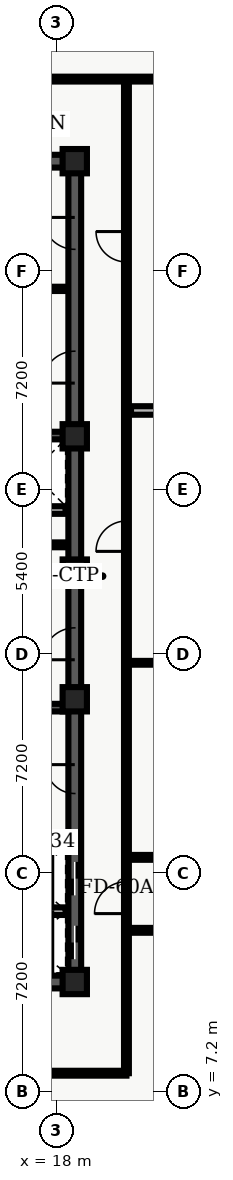
"""IFC4 building model, lengths in metres.
Left out: names, types, materials, properties, quantities, classifications, styles, units other than length and angle.
Written with IfcOpenShell. Run it as: python <this file> out.ifc"""

import sys

from ifc_helpers import new_model, entity, si_unit, converted_unit, direction, frame, origin_with_axes, origin_2d_with_axis, place, context, subcontext, project, spatial, polyline, rectangle, outline, extrude, element, fill, save


model = new_model("IFC4")
c1 = context("Model", 3, precision=1e-05, world=origin_with_axes(), true_north=direction((0.0, 1.0)))
c2 = subcontext(c1, "Body", "Model", "MODEL_VIEW")
j1 = project(units=[si_unit("LENGTHUNIT", "METRE"), converted_unit("PLANEANGLEUNIT", "DEGREE", entity("IfcPlaneAngleMeasure", 0.017), si_unit("PLANEANGLEUNIT", "RADIAN"), dimensions=[0, 0, 0, 0, 0, 0, 0])], contexts=[c1])
p1 = place(None, origin_with_axes())
s1 = spatial("IfcSite", under=j1, at=p1, CompositionType="ELEMENT")
p2 = place(p1, origin_with_axes())
s2 = spatial("IfcBuilding", under=s1, at=p2, CompositionType="ELEMENT")
p3 = place(p2, frame((0.0, 0.0, 256.8), z_axis=(0.0, 0.0, 1.0), x_axis=(1.0, 0.0, 0.0)))
s3 = spatial("IfcBuildingStorey", under=s2, at=p3, CompositionType="ELEMENT", Elevation=256.8)
p4 = place(p3, frame((11.4, 10.8, 0.0), z_axis=(0.0, 0.0, 1.0), x_axis=(1.0, 0.0, 0.0)))
e1 = element("IfcWall", 1, at=p4, inside=s3, PredefinedType="SHEAR", context=c2, shape_type="SweptSolid", body=[
    extrude(outline(polyline([(0.0, -0.21), (7.2, -0.21), (7.2, 0.21), (0.0, 0.21), (0.0, -0.21)])), origin_with_axes(), (0.0, 0.0, 1.0), 3.66),
])
p5 = place(p4, frame((2.625, 0.0, 0.0), z_axis=(0.0, 0.0, 1.0), x_axis=(1.0, 0.0, 0.0)))
e2 = element("IfcOpeningElement", 2, at=p5, cuts=e1, PredefinedType="OPENING", context=c2, shape_type="SweptSolid", body=[
    extrude(rectangle(XDim=1.05, YDim=0.44, at=origin_2d_with_axis()), origin_with_axes(), (0.0, 0.0, 1.0), 2.15),
])
p6 = place(p3, frame((11.4, 37.8, 0.0), z_axis=(0.0, 0.0, 1.0), x_axis=(1.0, 0.0, 0.0)))
e3 = element("IfcWall", 3, at=p6, inside=s3, PredefinedType="SHEAR", context=c2, shape_type="SweptSolid", body=[
    extrude(outline(polyline([(0.0, -0.21), (7.2, -0.21), (7.2, 0.21), (0.0, 0.21), (0.0, -0.21)])), origin_with_axes(), (0.0, 0.0, 1.0), 3.66),
])
p7 = place(p6, frame((2.625, 0.0, 0.0), z_axis=(0.0, 0.0, 1.0), x_axis=(1.0, 0.0, 0.0)))
e4 = element("IfcOpeningElement", 4, at=p7, cuts=e3, PredefinedType="OPENING", context=c2, shape_type="SweptSolid", body=[
    extrude(rectangle(XDim=1.05, YDim=0.44, at=origin_2d_with_axis()), origin_with_axes(), (0.0, 0.0, 1.0), 2.15),
])
p8 = place(p3, frame((18.6, 10.8, 0.0), z_axis=(0.0, 0.0, 1.0), x_axis=(0.0, 1.0, 0.0)))
e5 = element("IfcWall", 5, at=p8, inside=s3, PredefinedType="SHEAR", context=c2, shape_type="SweptSolid", body=[
    extrude(outline(polyline([(0.0, -0.21), (13.5, -0.21), (13.5, 0.21), (0.0, 0.21), (0.0, -0.21)])), origin_with_axes(), (0.0, 0.0, 1.0), 3.66),
])
p9 = place(p8, frame((1.3, 0.0, 0.0), z_axis=(0.0, 0.0, 1.0), x_axis=(1.0, 0.0, 0.0)))
e6 = element("IfcOpeningElement", 6, at=p9, cuts=e5, PredefinedType="OPENING", context=c2, shape_type="SweptSolid", body=[
    extrude(rectangle(XDim=1.1, YDim=0.44, at=origin_2d_with_axis()), origin_with_axes(), (0.0, 0.0, 1.0), 2.15),
])
p10 = place(p8, frame((3.4, 0.0, 0.0), z_axis=(0.0, 0.0, 1.0), x_axis=(1.0, 0.0, 0.0)))
e7 = element("IfcOpeningElement", 7, at=p10, cuts=e5, PredefinedType="OPENING", context=c2, shape_type="SweptSolid", body=[
    extrude(rectangle(XDim=1.1, YDim=0.44, at=origin_2d_with_axis()), origin_with_axes(), (0.0, 0.0, 1.0), 2.15),
])
p11 = place(p8, frame((11.125, 0.0, 0.0), z_axis=(0.0, 0.0, 1.0), x_axis=(1.0, 0.0, 0.0)))
e8 = element("IfcOpeningElement", 8, at=p11, cuts=e5, PredefinedType="OPENING", context=c2, shape_type="SweptSolid", body=[
    extrude(rectangle(XDim=1.05, YDim=0.44, at=origin_2d_with_axis()), origin_with_axes(), (0.0, 0.0, 1.0), 2.15),
])
p12 = place(p8, frame((6.675, 0.0, 0.0), z_axis=(0.0, 0.0, 1.0), x_axis=(1.0, 0.0, 0.0)))
e9 = element("IfcOpeningElement", 9, at=p12, cuts=e5, PredefinedType="OPENING", context=c2, shape_type="SweptSolid", body=[
    extrude(rectangle(XDim=0.95, YDim=0.44, at=origin_2d_with_axis()), origin_with_axes(), (0.0, 0.0, 1.0), 2.15),
])
p13 = place(p3, frame((18.6, 24.3, 0.0), z_axis=(0.0, 0.0, 1.0), x_axis=(0.0, 1.0, 0.0)))
e10 = element("IfcWall", 10, at=p13, inside=s3, PredefinedType="SHEAR", context=c2, shape_type="SweptSolid", body=[
    extrude(outline(polyline([(0.0, -0.21), (13.5, -0.21), (13.5, 0.21), (0.0, 0.21), (0.0, -0.21)])), origin_with_axes(), (0.0, 0.0, 1.0), 3.66),
])
p14 = place(p13, frame((6.725, 0.0, 0.0), z_axis=(0.0, 0.0, 1.0), x_axis=(1.0, 0.0, 0.0)))
e11 = element("IfcOpeningElement", 11, at=p14, cuts=e10, PredefinedType="OPENING", context=c2, shape_type="SweptSolid", body=[
    extrude(rectangle(XDim=1.05, YDim=0.44, at=origin_2d_with_axis()), origin_with_axes(), (0.0, 0.0, 1.0), 2.15),
])
p15 = place(p13, frame((11.125, 0.0, 0.0), z_axis=(0.0, 0.0, 1.0), x_axis=(1.0, 0.0, 0.0)))
e12 = element("IfcOpeningElement", 12, at=p15, cuts=e10, PredefinedType="OPENING", context=c2, shape_type="SweptSolid", body=[
    extrude(rectangle(XDim=1.05, YDim=0.44, at=origin_2d_with_axis()), origin_with_axes(), (0.0, 0.0, 1.0), 2.15),
])
for number, where, z_axis, x_axis in (
    (13, (11.61, 19.825, 0.0), (0.0, 0.0, 1.0), (1.0, 0.0, 0.0)),
    (14, (11.61, 28.775, 0.0), (0.0, 0.0, 1.0), (1.0, 0.0, 0.0)),
):
    element("IfcWall", number, at=place(p3, frame(where, z_axis=z_axis, x_axis=x_axis)), inside=s3, PredefinedType="SHEAR", context=c2, shape_type="SweptSolid", body=[
        extrude(outline(polyline([(0.0, -0.125), (6.78, -0.125), (6.78, 0.125), (0.0, 0.125), (0.0, -0.125)])), origin_with_axes(), (0.0, 0.0, 1.0), 3.66),
    ])
p16 = place(p3, frame((11.7, 24.1, 0.0), z_axis=(0.0, 0.0, 1.0), x_axis=(1.0, 0.0, 0.0)))
e15 = element("IfcWall", 15, at=p16, inside=s3, PredefinedType="SOLIDWALL", context=c2, shape_type="SweptSolid", body=[
    extrude(outline(polyline([(0.0, -0.125), (6.6, -0.125), (6.6, 0.125), (0.0, 0.125), (0.0, -0.125)])), origin_with_axes(), (0.0, 0.0, 1.0), 2.7),
])
p17 = place(p16, frame((3.75, 0.0, 0.0), z_axis=(0.0, 0.0, 1.0), x_axis=(1.0, 0.0, 0.0)))
e16 = element("IfcOpeningElement", 16, at=p17, cuts=e15, PredefinedType="OPENING", context=c2, shape_type="SweptSolid", body=[
    extrude(rectangle(XDim=0.9, YDim=0.27, at=origin_2d_with_axis()), origin_with_axes(), (0.0, 0.0, 1.0), 2.15),
])
p18 = place(p3, frame((11.7, 26.325, 0.0), z_axis=(0.0, 0.0, 1.0), x_axis=(1.0, 0.0, 0.0)))
e17 = element("IfcWall", 17, at=p18, inside=s3, PredefinedType="SOLIDWALL", context=c2, shape_type="SweptSolid", body=[
    extrude(outline(polyline([(0.0, -0.125), (6.6, -0.125), (6.6, 0.125), (0.0, 0.125), (0.0, -0.125)])), origin_with_axes(), (0.0, 0.0, 1.0), 2.7),
])
p19 = place(p18, frame((3.5, 0.0, 0.0), z_axis=(0.0, 0.0, 1.0), x_axis=(1.0, 0.0, 0.0)))
e18 = element("IfcOpeningElement", 18, at=p19, cuts=e17, PredefinedType="OPENING", context=c2, shape_type="SweptSolid", body=[
    extrude(rectangle(XDim=0.9, YDim=0.27, at=origin_2d_with_axis()), origin_with_axes(), (0.0, 0.0, 1.0), 2.15),
])
for number, where, z_axis, x_axis in (
    (19, (18.6, 10.8, 0.0), (0.0, 0.0, 1.0), (1.0, 0.0, 0.0)),
    (20, (18.6, 20.1, 0.0), (0.0, 0.0, 1.0), (1.0, 0.0, 0.0)),
    (21, (18.6, 24.3, 0.0), (0.0, 0.0, 1.0), (1.0, 0.0, 0.0)),
    (22, (18.6, 28.75, 0.0), (0.0, 0.0, 1.0), (1.0, 0.0, 0.0)),
    (23, (18.6, 37.8, 0.0), (0.0, 0.0, 1.0), (1.0, 0.0, 0.0)),
):
    element("IfcColumn", number, at=place(p3, frame(where, z_axis=z_axis, x_axis=x_axis)), inside=s3, PredefinedType="COLUMN", context=c2, shape_type="SweptSolid", body=[
        extrude(rectangle(XDim=0.8, YDim=0.8, at=origin_2d_with_axis()), origin_with_axes(), (0.0, 0.0, 1.0), 3.9),
    ])
p20 = place(p3, frame((14.62, 25.18, 0.0), z_axis=(0.0, 0.0, 1.0), x_axis=(1.0, 0.0, 0.0)))
e24 = element("IfcWall", 24, at=p20, inside=s3, PredefinedType="PARTITIONING", context=c2, shape_type="SweptSolid", body=[
    extrude(outline(polyline([(0.0, -0.08), (3.68, -0.08), (3.68, 0.08), (0.0, 0.08), (0.0, -0.08)])), origin_with_axes(), (0.0, 0.0, 1.0), 2.7),
])
p21 = place(p20, frame((1.95, 0.0, 0.0), z_axis=(0.0, 0.0, 1.0), x_axis=(1.0, 0.0, 0.0)))
e25 = element("IfcOpeningElement", 25, at=p21, cuts=e24, PredefinedType="OPENING", context=c2, shape_type="SweptSolid", body=[
    extrude(rectangle(XDim=0.9, YDim=0.18, at=origin_2d_with_axis()), origin_with_axes(), (0.0, 0.0, 1.0), 2.15),
])
for number, where, z_axis, x_axis in (
    (26, (15.84, 13.13, 0.0), (0.0, 0.0, 1.0), (1.0, 0.0, 0.0)),
    (27, (15.84, 15.27, 0.0), (0.0, 0.0, 1.0), (1.0, 0.0, 0.0)),
):
    element("IfcWall", number, at=place(p3, frame(where, z_axis=z_axis, x_axis=x_axis)), inside=s3, PredefinedType="SOLIDWALL", context=c2, shape_type="SweptSolid", body=[
        extrude(outline(polyline([(0.0, -0.125), (2.46, -0.125), (2.46, 0.125), (0.0, 0.125), (0.0, -0.125)])), origin_with_axes(), (0.0, 0.0, 1.0), 2.7),
    ])
p22 = place(p3, frame((15.84, 33.6, 0.0), z_axis=(0.0, 0.0, 1.0), x_axis=(1.0, 0.0, 0.0)))
e28 = element("IfcWall", 28, at=p22, inside=s3, PredefinedType="PARTITIONING", context=c2, shape_type="SweptSolid", body=[
    extrude(outline(polyline([(0.0, -0.07), (2.46, -0.07), (2.46, 0.07), (0.0, 0.07), (0.0, -0.07)])), origin_with_axes(), (0.0, 0.0, 1.0), 2.7),
])
p23 = place(p3, frame((8.135, 7.8, 0.0), z_axis=(0.0, 0.0, 1.0), x_axis=(1.0, 0.0, 0.0)))
e29 = element("IfcWall", 29, at=p23, inside=s3, PredefinedType="PARTITIONING", context=c2, shape_type="SweptSolid", body=[
    extrude(outline(polyline([(0.0, -0.08), (12.165, -0.08), (12.165, 0.08), (0.0, 0.08), (0.0, -0.08)])), origin_with_axes(), (0.0, 0.0, 1.0), 2.7),
])
p24 = place(p23, frame((3.967, 0.0, 0.0), z_axis=(0.0, 0.0, 1.0), x_axis=(1.0, 0.0, 0.0)))
e30 = element("IfcOpeningElement", 30, at=p24, cuts=e29, PredefinedType="OPENING", context=c2, shape_type="SweptSolid", body=[
    extrude(rectangle(XDim=1.0, YDim=0.18, at=origin_2d_with_axis()), origin_with_axes(), (0.0, 0.0, 1.0), 2.15),
])
p25 = place(p23, frame((8.767, 0.0, 0.0), z_axis=(0.0, 0.0, 1.0), x_axis=(1.0, 0.0, 0.0)))
e31 = element("IfcOpeningElement", 31, at=p25, cuts=e29, PredefinedType="OPENING", context=c2, shape_type="SweptSolid", body=[
    extrude(rectangle(XDim=1.0, YDim=0.18, at=origin_2d_with_axis()), origin_with_axes(), (0.0, 0.0, 1.0), 2.15),
])
p26 = place(p3, frame((8.135, 40.5, 0.0), z_axis=(0.0, 0.0, 1.0), x_axis=(1.0, 0.0, 0.0)))
e32 = element("IfcWall", 32, at=p26, inside=s3, PredefinedType="PARTITIONING", context=c2, shape_type="SweptSolid", body=[
    extrude(outline(polyline([(0.0, -0.08), (23.93, -0.08), (23.93, 0.08), (0.0, 0.08), (0.0, -0.08)])), origin_with_axes(), (0.0, 0.0, 1.0), 2.7),
])
p27 = place(p26, frame((0.76, 0.0, 0.0), z_axis=(0.0, 0.0, 1.0), x_axis=(1.0, 0.0, 0.0)))
e33 = element("IfcOpeningElement", 33, at=p27, cuts=e32, PredefinedType="OPENING", context=c2, shape_type="SweptSolid", body=[
    extrude(rectangle(XDim=1.0, YDim=0.18, at=origin_2d_with_axis()), origin_with_axes(), (0.0, 0.0, 1.0), 2.15),
])
p28 = place(p26, frame((7.625, 0.0, 0.0), z_axis=(0.0, 0.0, 1.0), x_axis=(1.0, 0.0, 0.0)))
e34 = element("IfcOpeningElement", 34, at=p28, cuts=e32, PredefinedType="OPENING", context=c2, shape_type="SweptSolid", body=[
    extrude(rectangle(XDim=1.0, YDim=0.18, at=origin_2d_with_axis()), origin_with_axes(), (0.0, 0.0, 1.0), 2.15),
])
p29 = place(p3, frame((20.3, 7.8, 0.0), z_axis=(0.0, 0.0, 1.0), x_axis=(0.0, 1.0, 0.0)))
e35 = element("IfcWall", 35, at=p29, inside=s3, PredefinedType="PARTITIONING", context=c2, shape_type="SweptSolid", body=[
    extrude(outline(polyline([(0.0, -0.08), (32.7, -0.08), (32.7, 0.08), (0.0, 0.08), (0.0, -0.08)])), origin_with_axes(), (0.0, 0.0, 1.0), 2.7),
])
p30 = place(p29, frame((17.665, 0.0, 0.0), z_axis=(0.0, 0.0, 1.0), x_axis=(1.0, 0.0, 0.0)))
e36 = element("IfcOpeningElement", 36, at=p30, cuts=e35, PredefinedType="OPENING", context=c2, shape_type="SweptSolid", body=[
    extrude(rectangle(XDim=1.0, YDim=0.18, at=origin_2d_with_axis()), origin_with_axes(), (0.0, 0.0, 1.0), 2.15),
])
p31 = place(p29, frame((27.185, 0.0, 0.0), z_axis=(0.0, 0.0, 1.0), x_axis=(1.0, 0.0, 0.0)))
e37 = element("IfcOpeningElement", 37, at=p31, cuts=e35, PredefinedType="OPENING", context=c2, shape_type="SweptSolid", body=[
    extrude(rectangle(XDim=1.0, YDim=0.18, at=origin_2d_with_axis()), origin_with_axes(), (0.0, 0.0, 1.0), 2.15),
])
p32 = place(p29, frame((5.775, 0.0, 0.0), z_axis=(0.0, 0.0, 1.0), x_axis=(1.0, 0.0, 0.0)))
e38 = element("IfcOpeningElement", 38, at=p32, cuts=e35, PredefinedType="OPENING", context=c2, shape_type="SweptSolid", body=[
    extrude(rectangle(XDim=1.05, YDim=0.18, at=origin_2d_with_axis()), origin_with_axes(), (0.0, 0.0, 1.0), 2.15),
])
p33 = place(p3, frame((20.45, 29.6, 0.0), z_axis=(0.0, 0.0, 1.0), x_axis=(1.0, 0.0, 0.0)))
e39 = element("IfcWall", 39, at=p33, inside=s3, PredefinedType="PARTITIONING", context=c2, shape_type="SweptSolid", body=[
    extrude(outline(polyline([(0.0, -0.14), (11.615, -0.14), (11.615, 0.14), (0.0, 0.14), (0.0, -0.14)])), origin_with_axes(), (0.0, 0.0, 1.0), 2.7),
])
p34 = place(p3, frame((20.3, 12.5, 0.0), z_axis=(0.0, 0.0, 1.0), x_axis=(1.0, 0.0, 0.0)))
e40 = element("IfcWall", 40, at=p34, inside=s3, PredefinedType="PARTITIONING", context=c2, shape_type="SweptSolid", body=[
    extrude(outline(polyline([(0.0, -0.08), (16.05, -0.08), (16.05, 0.08), (0.0, 0.08), (0.0, -0.08)])), origin_with_axes(), (0.0, 0.0, 1.0), 2.7),
])
p35 = place(p34, frame((3.645, 0.0, 0.0), z_axis=(0.0, 0.0, 1.0), x_axis=(1.0, 0.0, 0.0)))
e41 = element("IfcOpeningElement", 41, at=p35, cuts=e40, PredefinedType="OPENING", context=c2, shape_type="SweptSolid", body=[
    extrude(rectangle(XDim=1.0, YDim=0.18, at=origin_2d_with_axis()), origin_with_axes(), (0.0, 0.0, 1.0), 2.15),
])
p36 = place(p34, frame((11.54, 0.0, 0.0), z_axis=(0.0, 0.0, 1.0), x_axis=(1.0, 0.0, 0.0)))
e42 = element("IfcOpeningElement", 42, at=p36, cuts=e40, PredefinedType="OPENING", context=c2, shape_type="SweptSolid", body=[
    extrude(rectangle(XDim=1.0, YDim=0.18, at=origin_2d_with_axis()), origin_with_axes(), (0.0, 0.0, 1.0), 2.15),
])
p37 = place(p3, frame((20.3, 14.9, 0.0), z_axis=(0.0, 0.0, 1.0), x_axis=(1.0, 0.0, 0.0)))
e43 = element("IfcWall", 43, at=p37, inside=s3, PredefinedType="PARTITIONING", context=c2, shape_type="SweptSolid", body=[
    extrude(outline(polyline([(0.0, -0.08), (16.05, -0.08), (16.05, 0.08), (0.0, 0.08), (0.0, -0.08)])), origin_with_axes(), (0.0, 0.0, 1.0), 2.7),
])
p38 = place(p37, frame((5.582, 0.0, 0.0), z_axis=(0.0, 0.0, 1.0), x_axis=(1.0, 0.0, 0.0)))
e44 = element("IfcOpeningElement", 44, at=p38, cuts=e43, PredefinedType="OPENING", context=c2, shape_type="SweptSolid", body=[
    extrude(rectangle(XDim=1.2, YDim=0.18, at=origin_2d_with_axis()), origin_with_axes(), (0.0, 0.0, 1.0), 2.2),
])
p39 = place(p37, frame((13.477, 0.0, 0.0), z_axis=(0.0, 0.0, 1.0), x_axis=(1.0, 0.0, 0.0)))
e45 = element("IfcOpeningElement", 45, at=p39, cuts=e43, PredefinedType="OPENING", context=c2, shape_type="SweptSolid", body=[
    extrude(rectangle(XDim=1.0, YDim=0.18, at=origin_2d_with_axis()), origin_with_axes(), (0.0, 0.0, 1.0), 2.15),
])
p40 = place(p3, frame((20.3, 21.3, 0.0), z_axis=(0.0, 0.0, 1.0), x_axis=(1.0, 0.0, 0.0)))
e46 = element("IfcWall", 46, at=p40, inside=s3, PredefinedType="PARTITIONING", context=c2, shape_type="SweptSolid", body=[
    extrude(outline(polyline([(0.0, -0.062), (11.765, -0.062), (11.765, 0.062), (0.0, 0.062), (0.0, -0.062)])), origin_with_axes(), (0.0, 0.0, 1.0), 2.7),
])
p41 = place(p8, frame((1.3, 0.0, 0.0), z_axis=(0.0, 0.0, 1.0), x_axis=(1.0, 0.0, 0.0)))
e47 = element("IfcDoor", 47, at=p41, inside=s3, OperationType="SLIDING_TO_LEFT", PredefinedType="DOOR", context=c2, shape_type="SweptSolid", body=[
    extrude(rectangle(XDim=1.1, YDim=0.09, at=origin_2d_with_axis()), origin_with_axes(), (0.0, 0.0, 1.0), 2.15),
])
fill(e6, e47)
p42 = place(p8, frame((3.4, 0.0, 0.0), z_axis=(0.0, 0.0, 1.0), x_axis=(1.0, 0.0, 0.0)))
e48 = element("IfcDoor", 48, at=p42, inside=s3, OperationType="SLIDING_TO_RIGHT", PredefinedType="DOOR", context=c2, shape_type="SweptSolid", body=[
    extrude(rectangle(XDim=1.1, YDim=0.09, at=origin_2d_with_axis()), origin_with_axes(), (0.0, 0.0, 1.0), 2.15),
])
fill(e7, e48)
p43 = place(p8, frame((11.125, 0.0, 0.0), z_axis=(0.0, 0.0, 1.0), x_axis=(1.0, 0.0, 0.0)))
e49 = element("IfcDoor", 49, at=p43, inside=s3, OperationType="SINGLE_SWING_LEFT", PredefinedType="DOOR", context=c2, shape_type="SweptSolid", body=[
    extrude(rectangle(XDim=1.05, YDim=0.09, at=origin_2d_with_axis()), origin_with_axes(), (0.0, 0.0, 1.0), 2.15),
])
fill(e8, e49)
p44 = place(p8, frame((6.675, 0.0, 0.0), z_axis=(0.0, 0.0, 1.0), x_axis=(1.0, 0.0, 0.0)))
e50 = element("IfcDoor", 50, at=p44, inside=s3, OperationType="SINGLE_SWING_RIGHT", PredefinedType="DOOR", context=c2, shape_type="SweptSolid", body=[
    extrude(rectangle(XDim=0.95, YDim=0.09, at=origin_2d_with_axis()), origin_with_axes(), (0.0, 0.0, 1.0), 2.15),
])
fill(e9, e50)
p45 = place(p13, frame((6.725, 0.0, 0.0), z_axis=(0.0, 0.0, 1.0), x_axis=(1.0, 0.0, 0.0)))
e51 = element("IfcDoor", 51, at=p45, inside=s3, OperationType="SINGLE_SWING_LEFT", PredefinedType="DOOR", context=c2, shape_type="SweptSolid", body=[
    extrude(rectangle(XDim=1.05, YDim=0.09, at=origin_2d_with_axis()), origin_with_axes(), (0.0, 0.0, 1.0), 2.15),
])
fill(e11, e51)
p46 = place(p13, frame((11.125, 0.0, 0.0), z_axis=(0.0, 0.0, 1.0), x_axis=(1.0, 0.0, 0.0)))
e52 = element("IfcDoor", 52, at=p46, inside=s3, OperationType="SINGLE_SWING_RIGHT", PredefinedType="DOOR", context=c2, shape_type="SweptSolid", body=[
    extrude(rectangle(XDim=1.05, YDim=0.09, at=origin_2d_with_axis()), origin_with_axes(), (0.0, 0.0, 1.0), 2.15),
])
fill(e12, e52)
p47 = place(p29, frame((17.665, 0.0, 0.0), z_axis=(0.0, 0.0, 1.0), x_axis=(1.0, 0.0, 0.0)))
e53 = element("IfcDoor", 53, at=p47, inside=s3, OperationType="SINGLE_SWING_LEFT", PredefinedType="DOOR", context=c2, shape_type="SweptSolid", body=[
    extrude(rectangle(XDim=1.0, YDim=0.09, at=origin_2d_with_axis()), origin_with_axes(), (0.0, 0.0, 1.0), 2.15),
])
fill(e36, e53)
p48 = place(p29, frame((27.185, 0.0, 0.0), z_axis=(0.0, 0.0, 1.0), x_axis=(1.0, 0.0, 0.0)))
e54 = element("IfcDoor", 54, at=p48, inside=s3, OperationType="SINGLE_SWING_RIGHT", PredefinedType="DOOR", context=c2, shape_type="SweptSolid", body=[
    extrude(rectangle(XDim=1.0, YDim=0.09, at=origin_2d_with_axis()), origin_with_axes(), (0.0, 0.0, 1.0), 2.15),
])
fill(e37, e54)
p49 = place(p29, frame((5.775, 0.0, 0.0), z_axis=(0.0, 0.0, 1.0), x_axis=(1.0, 0.0, 0.0)))
e55 = element("IfcDoor", 55, at=p49, inside=s3, OperationType="SINGLE_SWING_LEFT", PredefinedType="DOOR", context=c2, shape_type="SweptSolid", body=[
    extrude(rectangle(XDim=1.05, YDim=0.09, at=origin_2d_with_axis()), origin_with_axes(), (0.0, 0.0, 1.0), 2.15),
])
fill(e38, e55)
save(model, sys.argv[1])
